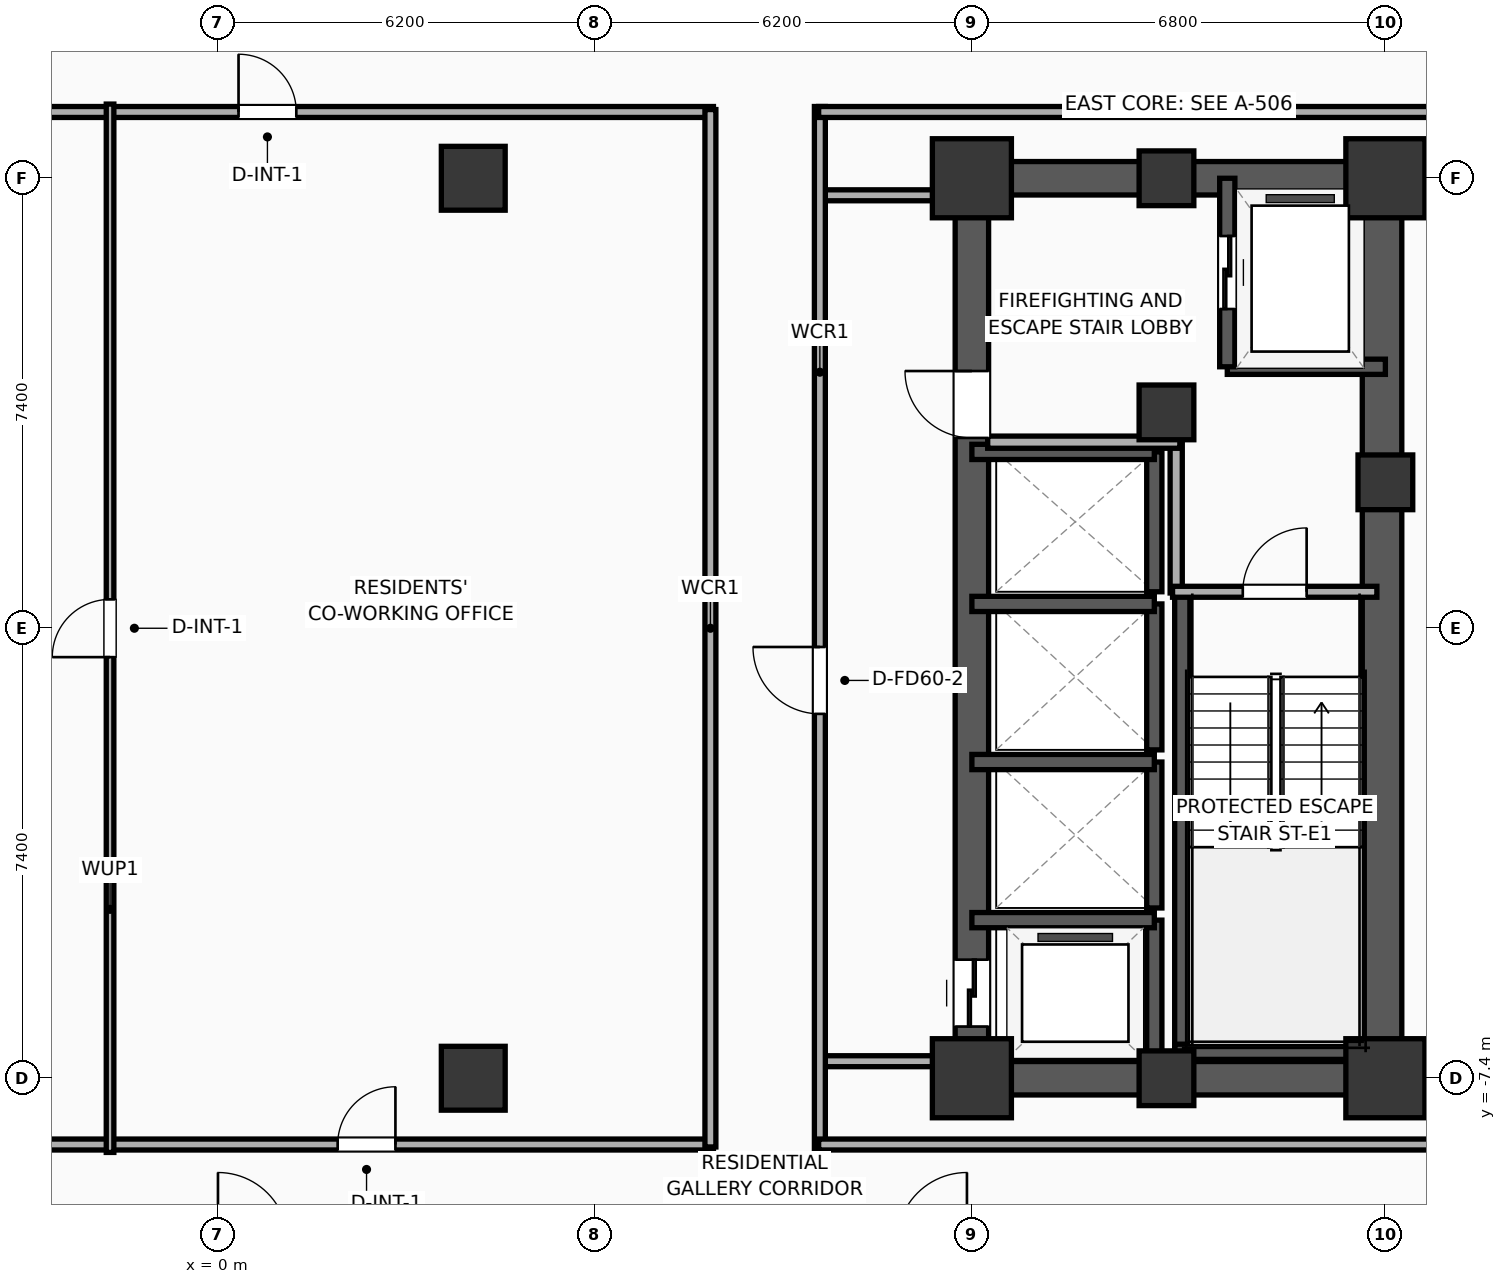
"""IFC4 building model, lengths in metres.
Left out: names, types, materials, properties, quantities, classifications, styles, units other than length and angle.
Written with IfcOpenShell. Run it as: python <this file> out.ifc"""

import sys

from ifc_helpers import new_model, si_unit, direction, frame, frame_2d, origin, origin_2d, place, context, subcontext, project, spatial, rectangle, extrude, element, fill, save


model = new_model("IFC4")
c1 = context("Model", 3, precision=1e-05, world=origin(), true_north=direction((0.0, 1.0)))
c2 = subcontext(c1, "Body", "Model", "MODEL_VIEW")
j1 = project(units=[si_unit("LENGTHUNIT", "METRE"), si_unit("PLANEANGLEUNIT", "RADIAN")], contexts=[c1])
p1 = place(None, origin())
s1 = spatial("IfcSite", under=j1, at=p1, CompositionType="ELEMENT")
p2 = place(p1, origin())
s2 = spatial("IfcBuilding", under=s1, at=p2, CompositionType="ELEMENT")
p3 = place(p2, frame((0.0, 0.0, 105.3)))
s3 = spatial("IfcBuildingStorey", under=s2, at=p3, CompositionType="ELEMENT", Elevation=105.3)
p4 = place(p3, frame((12.4, -7.4, 0.0), z_axis=(0.0, 0.0, 1.0), x_axis=(1.0, 0.0, 0.0)))
e1 = element("IfcColumn", 1, at=p4, inside=s3, PredefinedType="COLUMN", context=c2, shape_type="SweptSolid", body=[
    extrude(rectangle(XDim=1.3, YDim=1.3, at=origin_2d()), origin(), (0.0, 0.0, 1.0), 3.9),
])
p5 = place(p3, frame((15.6, 3.55, 0.0), z_axis=(0.0, 0.0, 1.0), x_axis=(1.0, 0.0, 0.0)))
e2 = element("IfcColumn", 2, at=p5, inside=s3, PredefinedType="COLUMN", context=c2, shape_type="SweptSolid", body=[
    extrude(rectangle(XDim=0.9, YDim=0.9, at=origin_2d()), origin(), (0.0, 0.0, 1.0), 3.9),
])
p6 = place(p3, frame((12.4, 7.4, 0.0), z_axis=(0.0, 0.0, 1.0), x_axis=(1.0, 0.0, 0.0)))
e3 = element("IfcColumn", 3, at=p6, inside=s3, PredefinedType="COLUMN", context=c2, shape_type="SweptSolid", body=[
    extrude(rectangle(XDim=1.3, YDim=1.3, at=origin_2d()), origin(), (0.0, 0.0, 1.0), 3.9),
])
for number, where, z_axis, x_axis in (
    (4, (15.6, -7.4, 0.0), (0.0, 0.0, 1.0), (1.0, 0.0, 0.0)),
    (5, (15.6, 7.4, 0.0), (0.0, 0.0, 1.0), (1.0, 0.0, 0.0)),
):
    element("IfcColumn", number, at=place(p3, frame(where, z_axis=z_axis, x_axis=x_axis)), inside=s3, PredefinedType="COLUMN", context=c2, shape_type="SweptSolid", body=[
        extrude(rectangle(XDim=0.9, YDim=0.9, at=origin_2d()), origin(), (0.0, 0.0, 1.0), 3.9),
    ])
p7 = place(p3, frame((19.2, -7.4, 0.0), z_axis=(0.0, 0.0, 1.0), x_axis=(1.0, 0.0, 0.0)))
e6 = element("IfcColumn", 6, at=p7, inside=s3, PredefinedType="COLUMN", context=c2, shape_type="SweptSolid", body=[
    extrude(rectangle(XDim=1.3, YDim=1.3, at=origin_2d()), origin(), (0.0, 0.0, 1.0), 3.9),
])
p8 = place(p3, frame((19.2, 2.4, 0.0), z_axis=(0.0, 0.0, 1.0), x_axis=(1.0, 0.0, 0.0)))
e7 = element("IfcColumn", 7, at=p8, inside=s3, PredefinedType="COLUMN", context=c2, shape_type="SweptSolid", body=[
    extrude(rectangle(XDim=0.9, YDim=0.9, at=origin_2d()), origin(), (0.0, 0.0, 1.0), 3.9),
])
p9 = place(p3, frame((19.2, 7.4, 0.0), z_axis=(0.0, 0.0, 1.0), x_axis=(1.0, 0.0, 0.0)))
e8 = element("IfcColumn", 8, at=p9, inside=s3, PredefinedType="COLUMN", context=c2, shape_type="SweptSolid", body=[
    extrude(rectangle(XDim=1.3, YDim=1.3, at=origin_2d()), origin(), (0.0, 0.0, 1.0), 3.9),
])
for number, where, z_axis, x_axis in (
    (9, (12.125, -7.4, 0.0), (0.0, 0.0, 1.0), (1.0, 0.0, 0.0)),
    (10, (12.125, 7.4, 0.0), (0.0, 0.0, 1.0), (1.0, 0.0, 0.0)),
):
    element("IfcWall", number, at=place(p3, frame(where, z_axis=z_axis, x_axis=x_axis)), inside=s3, PredefinedType="SHEAR", context=c2, shape_type="SweptSolid", body=[
        extrude(rectangle(XDim=7.35, YDim=0.55, at=frame_2d((3.675, 0.0))), origin(), (0.0, 0.0, 1.0), 3.65),
    ])
p10 = place(p3, frame((12.4, -7.4, 0.0), z_axis=(0.0, 0.0, 1.0), x_axis=(0.0, 1.0, 0.0)))
e11 = element("IfcWall", 11, at=p10, inside=s3, PredefinedType="SHEAR", context=c2, shape_type="SweptSolid", body=[
    extrude(rectangle(XDim=14.8, YDim=0.55, at=frame_2d((7.4, 0.0))), origin(), (0.0, 0.0, 1.0), 3.65),
])
p11 = place(p10, frame((0.85, 0.0, 0.0)))
e12 = element("IfcOpeningElement", 12, at=p11, cuts=e11, PredefinedType="OPENING", context=c2, shape_type="SweptSolid", body=[
    extrude(rectangle(XDim=1.1, YDim=2.05, at=frame_2d((0.55, 1.025))), frame((0.0, 0.285, 0.0), z_axis=(0.0, -1.0, 0.0), x_axis=(1.0, 0.0, 0.0)), (0.0, 0.0, 1.0), 0.57),
])
p12 = place(p10, frame((10.53, 0.0, 0.0)))
e13 = element("IfcOpeningElement", 13, at=p12, cuts=e11, PredefinedType="OPENING", context=c2, shape_type="SweptSolid", body=[
    extrude(rectangle(XDim=1.1, YDim=2.05, at=frame_2d((0.55, 1.025))), frame((0.0, 0.285, 0.0), z_axis=(0.0, -1.0, 0.0), x_axis=(1.0, 0.0, 0.0)), (0.0, 0.0, 1.0), 0.57),
])
p13 = place(p3, frame((19.145, -7.4, 0.0), z_axis=(0.0, 0.0, 1.0), x_axis=(0.0, 1.0, 0.0)))
e14 = element("IfcWall", 14, at=p13, inside=s3, PredefinedType="SHEAR", context=c2, shape_type="SweptSolid", body=[
    extrude(rectangle(XDim=14.8, YDim=0.65, at=frame_2d((7.4, 0.0))), origin(), (0.0, 0.0, 1.0), 3.65),
])
p14 = place(p3, frame((15.86, -7.085, 0.0), z_axis=(0.0, 0.0, 1.0), x_axis=(0.0, 1.0, 0.0)))
e15 = element("IfcWall", 15, at=p14, inside=s3, PredefinedType="SOLIDWALL", context=c2, shape_type="SweptSolid", body=[
    extrude(rectangle(XDim=7.685, YDim=0.25, at=frame_2d((3.843, 0.0))), origin(), (0.0, 0.0, 1.0), 3.65),
])
p15 = place(p3, frame((15.74, -6.965, 0.0), z_axis=(0.0, 0.0, 1.0), x_axis=(1.0, 0.0, 0.0)))
e16 = element("IfcWall", 16, at=p15, inside=s3, PredefinedType="SOLIDWALL", context=c2, shape_type="SweptSolid", body=[
    extrude(rectangle(XDim=3.46, YDim=0.25, at=frame_2d((1.73, 0.0))), origin(), (0.0, 0.0, 1.0), 3.65),
])
for number, where, z_axis, x_axis in (
    (17, (4.2, -7.4, 0.0), (0.0, 0.0, 1.0), (1.0, 0.0, 0.0)),
    (18, (4.2, 7.4, 0.0), (0.0, 0.0, 1.0), (1.0, 0.0, 0.0)),
):
    element("IfcColumn", number, at=place(p3, frame(where, z_axis=z_axis, x_axis=x_axis)), inside=s3, PredefinedType="COLUMN", context=c2, shape_type="SweptSolid", body=[
        extrude(rectangle(XDim=1.05, YDim=1.05, at=origin_2d()), origin(), (0.0, 0.0, 1.0), 3.9),
    ])
p16 = place(p3, frame((16.6, 4.3, 0.0), z_axis=(0.0, 0.0, 1.0), x_axis=(1.0, 0.0, 0.0)))
e19 = element("IfcWall", 19, at=p16, inside=s3, PredefinedType="SOLIDWALL", context=c2, shape_type="SweptSolid", body=[
    extrude(rectangle(XDim=2.6, YDim=0.25, at=frame_2d((1.3, 0.0))), origin(), (0.0, 0.0, 1.0), 3.65),
])
p17 = place(p3, frame((16.6, 7.4, 0.0), z_axis=(0.0, 0.0, 1.0), x_axis=(0.0, -1.0, 0.0)))
e20 = element("IfcWall", 20, at=p17, inside=s3, PredefinedType="SOLIDWALL", context=c2, shape_type="SweptSolid", body=[
    extrude(rectangle(XDim=3.1, YDim=0.25, at=frame_2d((1.55, 0.0))), origin(), (0.0, 0.0, 1.0), 3.65),
])
p18 = place(p17, frame((0.95, 0.0, 0.0)))
e21 = element("IfcOpeningElement", 21, at=p18, cuts=e20, PredefinedType="OPENING", context=c2, shape_type="SweptSolid", body=[
    extrude(rectangle(XDim=1.2, YDim=2.05, at=frame_2d((0.6, 1.025))), frame((0.0, 0.135, 0.0), z_axis=(0.0, -1.0, 0.0), x_axis=(1.0, 0.0, 0.0)), (0.0, 0.0, 1.0), 0.27),
])
p19 = place(p3, frame((15.4, -7.4, 0.0), z_axis=(0.0, 0.0, 1.0), x_axis=(0.0, 1.0, 0.0)))
e22 = element("IfcWall", 22, at=p19, inside=s3, PredefinedType="SOLIDWALL", context=c2, shape_type="SweptSolid", body=[
    extrude(rectangle(XDim=2.6, YDim=0.25, at=frame_2d((1.3, 0.0))), origin(), (0.0, 0.0, 1.0), 3.65),
])
p20 = place(p3, frame((15.4, -4.8, 0.0), z_axis=(0.0, 0.0, 1.0), x_axis=(-1.0, 0.0, 0.0)))
e23 = element("IfcWall", 23, at=p20, inside=s3, PredefinedType="SOLIDWALL", context=c2, shape_type="SweptSolid", body=[
    extrude(rectangle(XDim=3.0, YDim=0.25, at=frame_2d((1.5, 0.0))), origin(), (0.0, 0.0, 1.0), 3.65),
])
p21 = place(p3, frame((15.4, -4.6, 0.0), z_axis=(0.0, 0.0, 1.0), x_axis=(0.0, 1.0, 0.0)))
e24 = element("IfcWall", 24, at=p21, inside=s3, PredefinedType="SOLIDWALL", context=c2, shape_type="SweptSolid", body=[
    extrude(rectangle(XDim=2.4, YDim=0.25, at=frame_2d((1.2, 0.0))), origin(), (0.0, 0.0, 1.0), 3.65),
])
p22 = place(p3, frame((15.4, -2.2, 0.0), z_axis=(0.0, 0.0, 1.0), x_axis=(-1.0, 0.0, 0.0)))
e25 = element("IfcWall", 25, at=p22, inside=s3, PredefinedType="SOLIDWALL", context=c2, shape_type="SweptSolid", body=[
    extrude(rectangle(XDim=3.0, YDim=0.25, at=frame_2d((1.5, 0.0))), origin(), (0.0, 0.0, 1.0), 3.65),
])
p23 = place(p3, frame((15.4, -2.0, 0.0), z_axis=(0.0, 0.0, 1.0), x_axis=(0.0, 1.0, 0.0)))
e26 = element("IfcWall", 26, at=p23, inside=s3, PredefinedType="SOLIDWALL", context=c2, shape_type="SweptSolid", body=[
    extrude(rectangle(XDim=2.4, YDim=0.25, at=frame_2d((1.2, 0.0))), origin(), (0.0, 0.0, 1.0), 3.65),
])
p24 = place(p3, frame((15.4, 0.4, 0.0), z_axis=(0.0, 0.0, 1.0), x_axis=(-1.0, 0.0, 0.0)))
e27 = element("IfcWall", 27, at=p24, inside=s3, PredefinedType="SOLIDWALL", context=c2, shape_type="SweptSolid", body=[
    extrude(rectangle(XDim=3.0, YDim=0.25, at=frame_2d((1.5, 0.0))), origin(), (0.0, 0.0, 1.0), 3.65),
])
p25 = place(p3, frame((15.4, 0.6, 0.0), z_axis=(0.0, 0.0, 1.0), x_axis=(0.0, 1.0, 0.0)))
e28 = element("IfcWall", 28, at=p25, inside=s3, PredefinedType="SOLIDWALL", context=c2, shape_type="SweptSolid", body=[
    extrude(rectangle(XDim=2.3, YDim=0.25, at=frame_2d((1.15, 0.0))), origin(), (0.0, 0.0, 1.0), 3.65),
])
p26 = place(p3, frame((15.4, 2.9, 0.0), z_axis=(0.0, 0.0, 1.0), x_axis=(-1.0, 0.0, 0.0)))
e29 = element("IfcWall", 29, at=p26, inside=s3, PredefinedType="SOLIDWALL", context=c2, shape_type="SweptSolid", body=[
    extrude(rectangle(XDim=3.0, YDim=0.25, at=frame_2d((1.5, 0.0))), origin(), (0.0, 0.0, 1.0), 3.65),
])
p27 = place(p3, frame((15.76, 0.58, 0.0), z_axis=(0.0, 0.0, 1.0), x_axis=(0.0, 1.0, 0.0)))
e30 = element("IfcWall", 30, at=p27, inside=s3, PredefinedType="PARTITIONING", context=c2, shape_type="SweptSolid", body=[
    extrude(rectangle(XDim=2.52, YDim=0.2, at=frame_2d((1.26, 0.0))), origin(), (0.0, 0.0, 1.0), 3.65),
])
p28 = place(p3, frame((12.66, 3.06, 0.0), z_axis=(0.0, 0.0, 1.0), x_axis=(1.0, 0.0, 0.0)))
e31 = element("IfcWall", 31, at=p28, inside=s3, PredefinedType="PARTITIONING", context=c2, shape_type="SweptSolid", body=[
    extrude(rectangle(XDim=3.16, YDim=0.2, at=frame_2d((1.58, 0.0))), origin(), (0.0, 0.0, 1.0), 3.65),
])
p29 = place(p3, frame((15.7, 0.6, 0.0), z_axis=(0.0, 0.0, 1.0), x_axis=(1.0, 0.0, 0.0)))
e32 = element("IfcWall", 32, at=p29, inside=s3, PredefinedType="PARTITIONING", context=c2, shape_type="SweptSolid", body=[
    extrude(rectangle(XDim=3.36, YDim=0.18, at=frame_2d((1.68, 0.0))), origin(), (0.0, 0.0, 1.0), 3.65),
])
p30 = place(p29, frame((1.155, 0.0, 0.0)))
e33 = element("IfcOpeningElement", 33, at=p30, cuts=e32, PredefinedType="OPENING", context=c2, shape_type="SweptSolid", body=[
    extrude(rectangle(XDim=1.05, YDim=2.05, at=frame_2d((0.525, 1.025))), frame((0.0, 0.1, 0.0), z_axis=(0.0, -1.0, 0.0), x_axis=(1.0, 0.0, 0.0)), (0.0, 0.0, 1.0), 0.2),
])
for number, where, z_axis, x_axis in (
    (34, (9.88, 7.12, 0.0), (0.0, 0.0, 1.0), (1.0, 0.0, 0.0)),
    (35, (9.88, -7.12, 0.0), (0.0, 0.0, 1.0), (1.0, 0.0, 0.0)),
):
    element("IfcWall", number, at=place(p3, frame(where, z_axis=z_axis, x_axis=x_axis)), inside=s3, PredefinedType="PARTITIONING", context=c2, shape_type="SweptSolid", body=[
        extrude(rectangle(XDim=2.27, YDim=0.18, at=frame_2d((1.135, 0.0))), origin(), (0.0, 0.0, 1.0), 3.65),
    ])
p31 = place(p3, frame((9.9, -8.58, 0.0), z_axis=(0.0, 0.0, 1.0), x_axis=(0.0, 1.0, 0.0)))
e36 = element("IfcWall", 36, at=p31, inside=s3, PredefinedType="PARTITIONING", context=c2, shape_type="SweptSolid", body=[
    extrude(rectangle(XDim=17.16, YDim=0.18, at=frame_2d((8.58, 0.0))), origin(), (0.0, 0.0, 1.0), 3.65),
])
p32 = place(p31, frame((7.172, 0.0, 0.0)))
e37 = element("IfcOpeningElement", 37, at=p32, cuts=e36, PredefinedType="OPENING", context=c2, shape_type="SweptSolid", body=[
    extrude(rectangle(XDim=1.1, YDim=2.05, at=frame_2d((0.55, 1.025))), frame((0.0, 0.1, 0.0), z_axis=(0.0, -1.0, 0.0), x_axis=(1.0, 0.0, 0.0)), (0.0, 0.0, 1.0), 0.2),
])
p33 = place(p3, frame((9.88, 8.49, 0.0), z_axis=(0.0, 0.0, 1.0), x_axis=(1.0, 0.0, 0.0)))
e38 = element("IfcWall", 38, at=p33, inside=s3, PredefinedType="PARTITIONING", context=c2, shape_type="SweptSolid", body=[
    extrude(rectangle(XDim=23.33, YDim=0.18, at=frame_2d((11.665, 0.0))), origin(), (0.0, 0.0, 1.0), 3.65),
])
p34 = place(p33, frame((18.115, 0.0, 0.0)))
e39 = element("IfcOpeningElement", 39, at=p34, cuts=e38, PredefinedType="OPENING", context=c2, shape_type="SweptSolid", body=[
    extrude(rectangle(XDim=1.15, YDim=2.05, at=frame_2d((0.575, 1.025))), frame((0.0, 0.1, 0.0), z_axis=(0.0, -1.0, 0.0), x_axis=(1.0, 0.0, 0.0)), (0.0, 0.0, 1.0), 0.2),
])
p35 = place(p3, frame((9.88, -8.49, 0.0), z_axis=(0.0, 0.0, 1.0), x_axis=(1.0, 0.0, 0.0)))
e40 = element("IfcWall", 40, at=p35, inside=s3, PredefinedType="PARTITIONING", context=c2, shape_type="SweptSolid", body=[
    extrude(rectangle(XDim=23.33, YDim=0.18, at=frame_2d((11.665, 0.0))), origin(), (0.0, 0.0, 1.0), 3.65),
])
p36 = place(p3, frame((-8.15, 8.49, 0.0), z_axis=(0.0, 0.0, 1.0), x_axis=(1.0, 0.0, 0.0)))
e41 = element("IfcWall", 41, at=p36, inside=s3, PredefinedType="PARTITIONING", context=c2, shape_type="SweptSolid", body=[
    extrude(rectangle(XDim=16.3, YDim=0.18, at=frame_2d((8.15, 0.0))), origin(), (0.0, 0.0, 1.0), 3.65),
])
p37 = place(p36, frame((8.49, 0.0, 0.0)))
e42 = element("IfcOpeningElement", 42, at=p37, cuts=e41, PredefinedType="OPENING", context=c2, shape_type="SweptSolid", body=[
    extrude(rectangle(XDim=0.95, YDim=2.05, at=frame_2d((0.475, 1.025))), frame((0.0, 0.1, 0.0), z_axis=(0.0, -1.0, 0.0), x_axis=(1.0, 0.0, 0.0)), (0.0, 0.0, 1.0), 0.2),
])
p38 = place(p3, frame((-8.15, -8.49, 0.0), z_axis=(0.0, 0.0, 1.0), x_axis=(1.0, 0.0, 0.0)))
e43 = element("IfcWall", 43, at=p38, inside=s3, PredefinedType="PARTITIONING", context=c2, shape_type="SweptSolid", body=[
    extrude(rectangle(XDim=16.3, YDim=0.18, at=frame_2d((8.15, 0.0))), origin(), (0.0, 0.0, 1.0), 3.65),
])
p39 = place(p38, frame((1.13, 0.0, 0.0)))
e44 = element("IfcOpeningElement", 44, at=p39, cuts=e43, PredefinedType="OPENING", context=c2, shape_type="SweptSolid", body=[
    extrude(rectangle(XDim=1.0, YDim=2.05, at=frame_2d((0.5, 1.025))), frame((0.0, 0.1, 0.0), z_axis=(0.0, -1.0, 0.0), x_axis=(1.0, 0.0, 0.0)), (0.0, 0.0, 1.0), 0.2),
])
p40 = place(p38, frame((10.12, 0.0, 0.0)))
e45 = element("IfcOpeningElement", 45, at=p40, cuts=e43, PredefinedType="OPENING", context=c2, shape_type="SweptSolid", body=[
    extrude(rectangle(XDim=0.95, YDim=2.05, at=frame_2d((0.475, 1.025))), frame((0.0, 0.1, 0.0), z_axis=(0.0, -1.0, 0.0), x_axis=(1.0, 0.0, 0.0)), (0.0, 0.0, 1.0), 0.2),
])
p41 = place(p3, frame((8.1, -8.53, 0.0), z_axis=(0.0, 0.0, 1.0), x_axis=(0.0, 1.0, 0.0)))
e46 = element("IfcWall", 46, at=p41, inside=s3, PredefinedType="PARTITIONING", context=c2, shape_type="SweptSolid", body=[
    extrude(rectangle(XDim=17.06, YDim=0.18, at=frame_2d((8.53, 0.0))), origin(), (0.0, 0.0, 1.0), 3.65),
])
p42 = place(p3, frame((-1.773, -8.62, 0.0), z_axis=(0.0, 0.0, 1.0), x_axis=(0.0, 1.0, 0.0)))
e47 = element("IfcWall", 47, at=p42, inside=s3, PredefinedType="PARTITIONING", context=c2, shape_type="SweptSolid", body=[
    extrude(rectangle(XDim=17.24, YDim=0.125, at=frame_2d((8.62, 0.0))), origin(), (0.0, 0.0, 1.0), 3.65),
])
p43 = place(p42, frame((8.145, 0.0, 0.0)))
e48 = element("IfcOpeningElement", 48, at=p43, cuts=e47, PredefinedType="OPENING", context=c2, shape_type="SweptSolid", body=[
    extrude(rectangle(XDim=0.95, YDim=2.05, at=frame_2d((0.475, 1.025))), frame((0.0, 0.073, 0.0), z_axis=(0.0, -1.0, 0.0), x_axis=(1.0, 0.0, 0.0)), (0.0, 0.0, 1.0), 0.145),
])
p44 = place(p18, origin())
e49 = element("IfcDoor", 49, at=p44, inside=s3, OperationType="SLIDING_TO_LEFT", PredefinedType="DOOR", context=c2, shape_type="SweptSolid", body=[
    extrude(rectangle(XDim=1.2, YDim=2.05, at=frame_2d((0.6, 1.025))), frame((0.0, 0.025, 0.0), z_axis=(0.0, -1.0, 0.0), x_axis=(1.0, 0.0, 0.0)), (0.0, 0.0, 1.0), 0.05),
])
fill(e21, e49)
p45 = place(p11, origin())
e50 = element("IfcDoor", 50, at=p45, inside=s3, OperationType="SLIDING_TO_LEFT", PredefinedType="DOOR", context=c2, shape_type="SweptSolid", body=[
    extrude(rectangle(XDim=1.1, YDim=2.05, at=frame_2d((0.55, 1.025))), frame((0.0, 0.025, 0.0), z_axis=(0.0, -1.0, 0.0), x_axis=(1.0, 0.0, 0.0)), (0.0, 0.0, 1.0), 0.05),
])
fill(e12, e50)
p46 = place(p30, origin())
e51 = element("IfcDoor", 51, at=p46, inside=s3, OperationType="SINGLE_SWING_RIGHT", PredefinedType="DOOR", context=c2, shape_type="SweptSolid", body=[
    extrude(rectangle(XDim=1.05, YDim=2.05, at=frame_2d((0.525, 1.025))), frame((0.0, 0.025, 0.0), z_axis=(0.0, -1.0, 0.0), x_axis=(1.0, 0.0, 0.0)), (0.0, 0.0, 1.0), 0.05),
])
fill(e33, e51)
p47 = place(p32, origin())
e52 = element("IfcDoor", 52, at=p47, inside=s3, OperationType="SINGLE_SWING_RIGHT", PredefinedType="DOOR", context=c2, shape_type="SweptSolid", body=[
    extrude(rectangle(XDim=1.1, YDim=2.05, at=frame_2d((0.55, 1.025))), frame((0.0, 0.025, 0.0), z_axis=(0.0, -1.0, 0.0), x_axis=(1.0, 0.0, 0.0)), (0.0, 0.0, 1.0), 0.05),
])
fill(e37, e52)
p48 = place(p37, origin())
e53 = element("IfcDoor", 53, at=p48, inside=s3, OperationType="SINGLE_SWING_LEFT", PredefinedType="DOOR", context=c2, shape_type="SweptSolid", body=[
    extrude(rectangle(XDim=0.95, YDim=2.05, at=frame_2d((0.475, 1.025))), frame((0.0, 0.025, 0.0), z_axis=(0.0, -1.0, 0.0), x_axis=(1.0, 0.0, 0.0)), (0.0, 0.0, 1.0), 0.05),
])
fill(e42, e53)
p49 = place(p40, origin())
e54 = element("IfcDoor", 54, at=p49, inside=s3, OperationType="SINGLE_SWING_RIGHT", PredefinedType="DOOR", context=c2, shape_type="SweptSolid", body=[
    extrude(rectangle(XDim=0.95, YDim=2.05, at=frame_2d((0.475, 1.025))), frame((0.0, 0.025, 0.0), z_axis=(0.0, -1.0, 0.0), x_axis=(1.0, 0.0, 0.0)), (0.0, 0.0, 1.0), 0.05),
])
fill(e45, e54)
p50 = place(p43, origin())
e55 = element("IfcDoor", 55, at=p50, inside=s3, OperationType="SINGLE_SWING_LEFT", PredefinedType="DOOR", context=c2, shape_type="SweptSolid", body=[
    extrude(rectangle(XDim=0.95, YDim=2.05, at=frame_2d((0.475, 1.025))), frame((0.0, 0.025, 0.0), z_axis=(0.0, -1.0, 0.0), x_axis=(1.0, 0.0, 0.0)), (0.0, 0.0, 1.0), 0.05),
])
fill(e48, e55)
p51 = place(p12, origin())
e56 = element("IfcDoor", 56, at=p51, inside=s3, OperationType="SINGLE_SWING_RIGHT", PredefinedType="DOOR", context=c2, shape_type="SweptSolid", body=[
    extrude(rectangle(XDim=1.1, YDim=2.05, at=frame_2d((0.55, 1.025))), frame((0.0, 0.025, 0.0), z_axis=(0.0, -1.0, 0.0), x_axis=(1.0, 0.0, 0.0)), (0.0, 0.0, 1.0), 0.05),
])
fill(e13, e56)
save(model, sys.argv[1])
